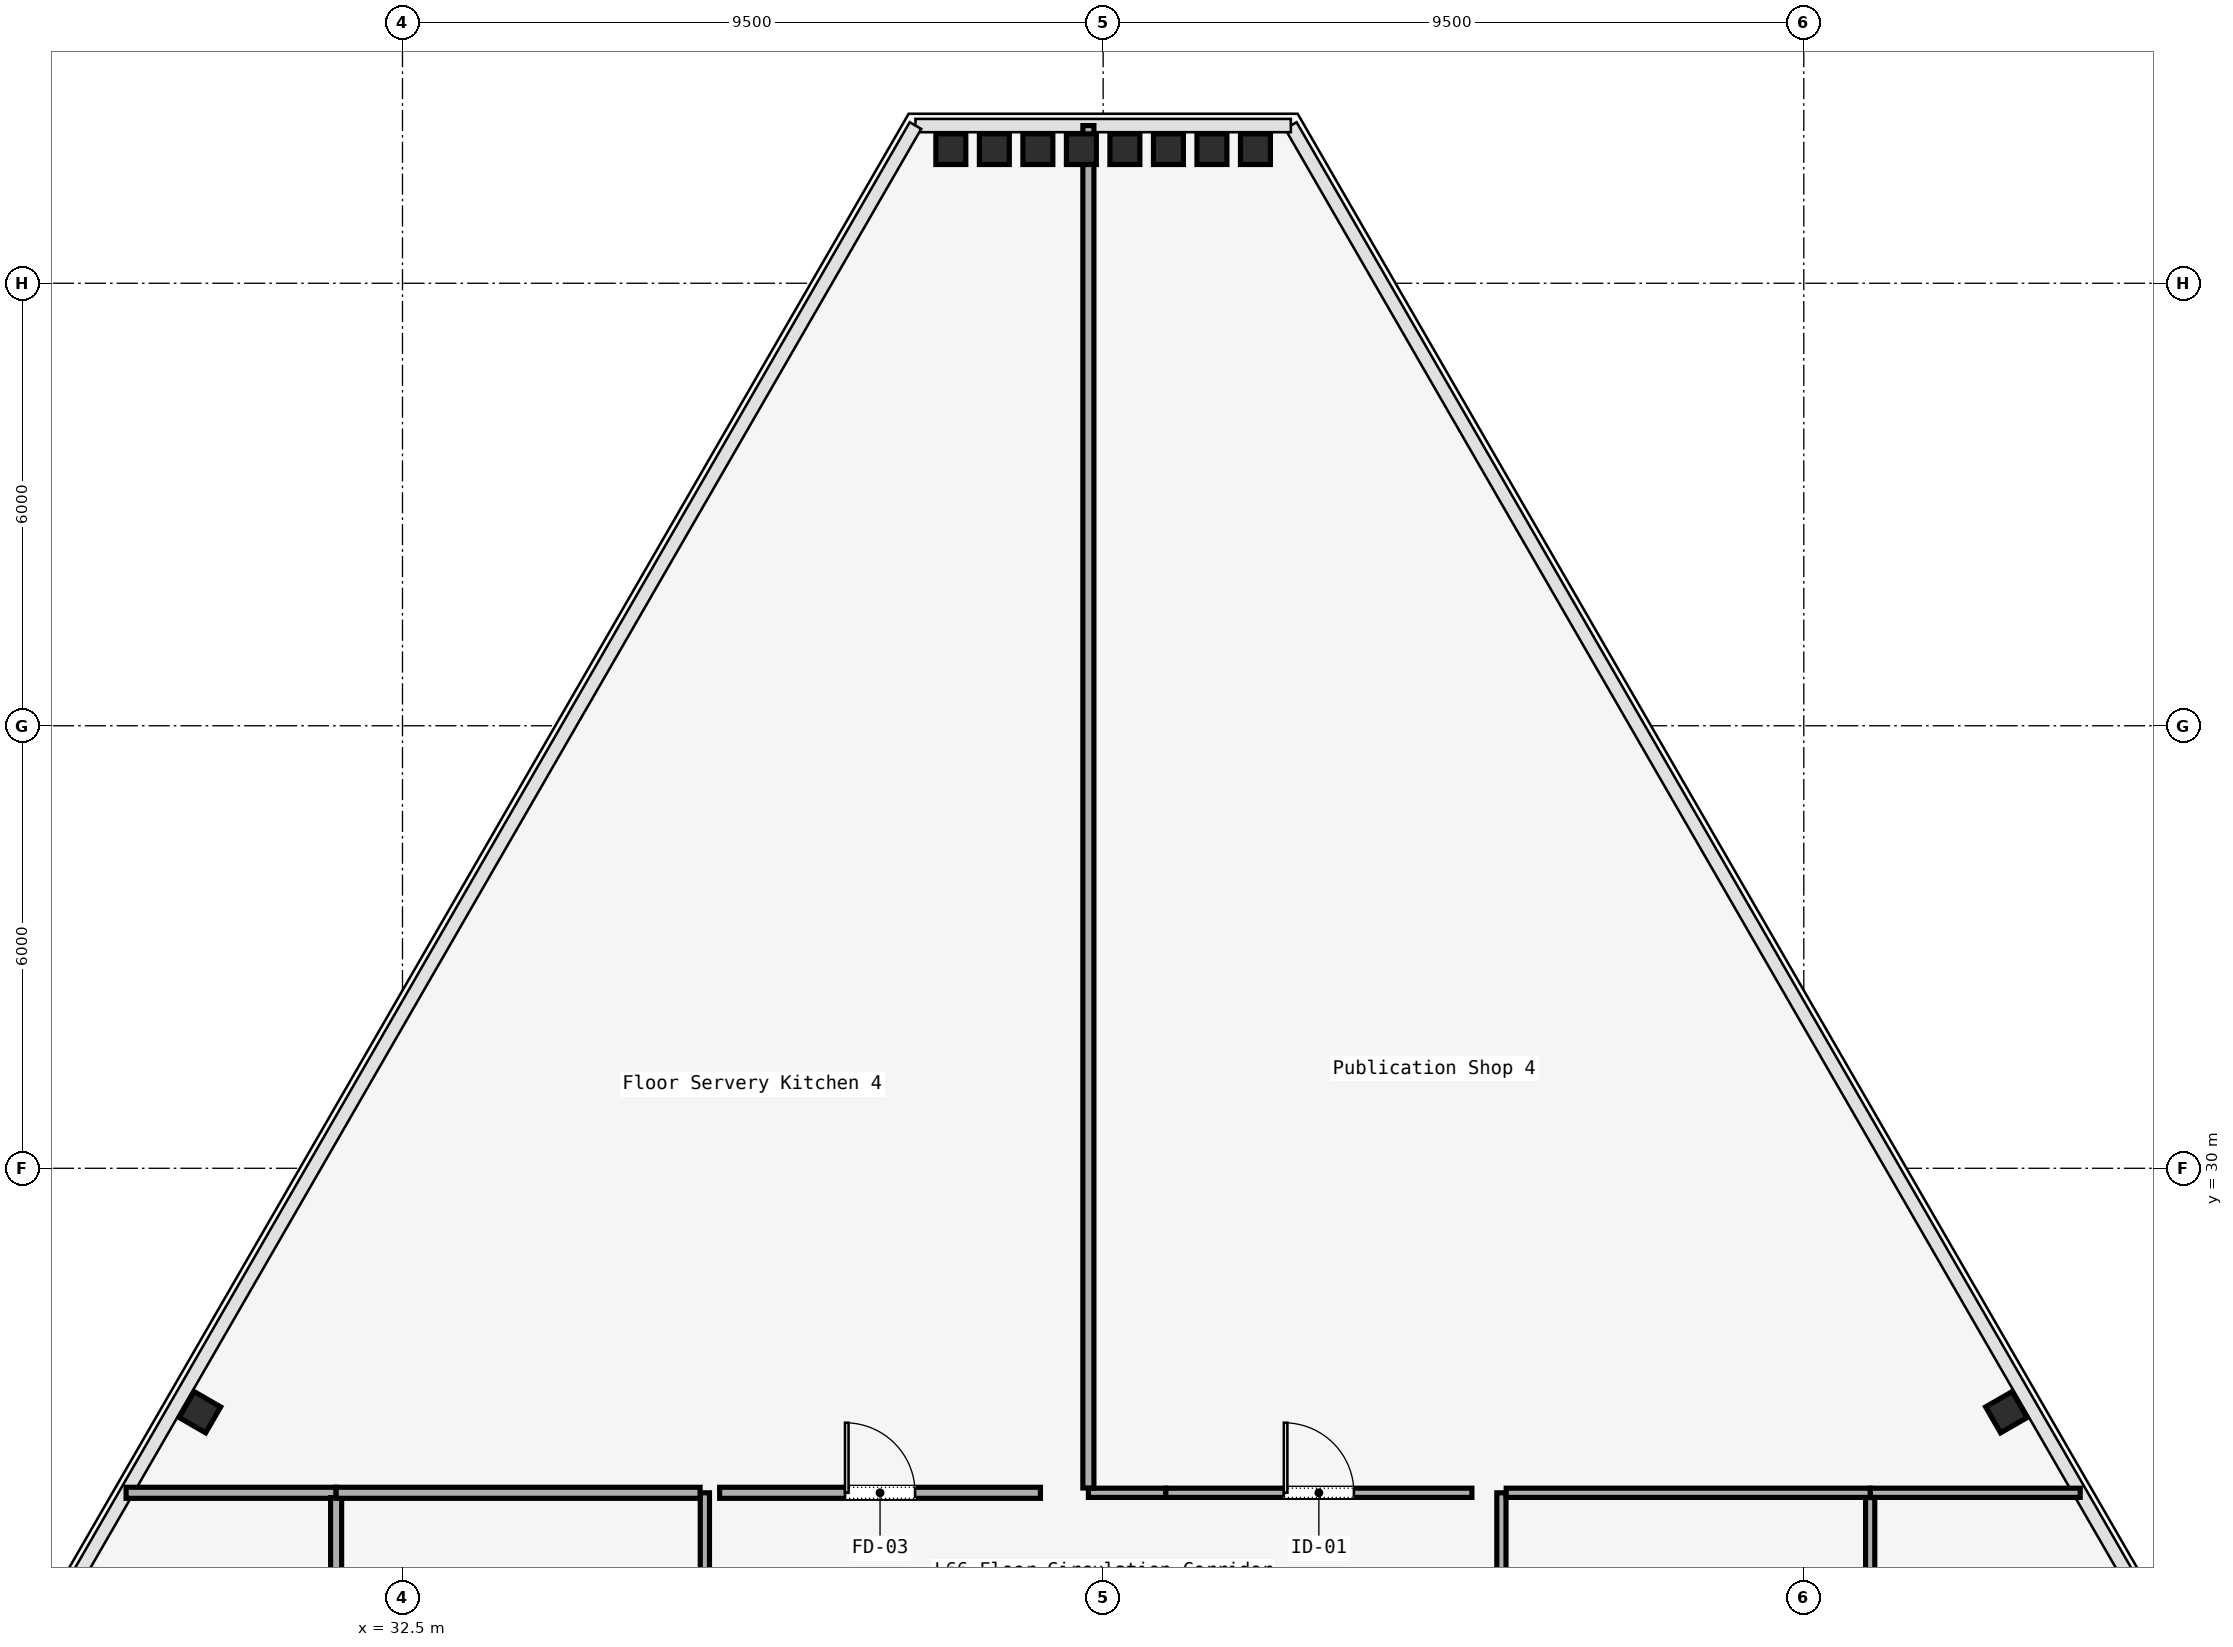
"""IFC4 building model, lengths in metres.
Left out: names, types, materials, properties, quantities, classifications, styles, units other than length and angle.
Written with IfcOpenShell. Run it as: python <this file> out.ifc"""

import sys

from ifc_helpers import new_model, si_unit, direction, frame, frame_2d, origin, origin_2d, place, context, subcontext, project, spatial, rectangle, i_section, extrude, element, fill, save


model = new_model("IFC4")
c1 = context("Model", 3, precision=1e-05, world=origin(), true_north=direction((0.0, 1.0)))
c2 = subcontext(c1, "Body", "Model", "MODEL_VIEW")
j1 = project(units=[si_unit("LENGTHUNIT", "METRE"), si_unit("PLANEANGLEUNIT", "RADIAN")], contexts=[c1])
p1 = place(None, origin())
s1 = spatial("IfcSite", under=j1, at=p1, CompositionType="ELEMENT")
p2 = place(p1, origin())
s2 = spatial("IfcBuilding", under=s1, at=p2, CompositionType="ELEMENT")
p3 = place(p2, frame((0.0, 0.0, 271.2)))
s3 = spatial("IfcBuildingStorey", under=s2, at=p3, CompositionType="ELEMENT", Elevation=271.2)
for number, where, z_axis, x_axis in (
    (1, (54.247, 26.693, 0.0), (0.0, 0.0, 1.0), (-0.5, 0.866, 0.0)),
    (2, (44.065, 43.818, 0.0), (0.0, 0.0, 1.0), (1.0, 0.0, 0.0)),
    (3, (43.475, 43.818, 0.0), (0.0, 0.0, 1.0), (1.0, 0.0, 0.0)),
    (4, (42.885, 43.818, 0.0), (0.0, 0.0, 1.0), (1.0, 0.0, 0.0)),
    (5, (42.295, 43.818, 0.0), (0.0, 0.0, 1.0), (1.0, 0.0, 0.0)),
    (6, (41.705, 43.818, 0.0), (0.0, 0.0, 1.0), (1.0, 0.0, 0.0)),
    (7, (41.115, 43.818, 0.0), (0.0, 0.0, 1.0), (1.0, 0.0, 0.0)),
    (8, (40.525, 43.818, 0.0), (0.0, 0.0, 1.0), (1.0, 0.0, 0.0)),
    (9, (39.935, 43.818, 0.0), (0.0, 0.0, 1.0), (1.0, 0.0, 0.0)),
    (10, (29.753, 26.693, 0.0), (0.0, 0.0, 1.0), (0.5, 0.866, 0.0)),
):
    element("IfcColumn", number, at=place(p3, frame(where, z_axis=z_axis, x_axis=x_axis)), inside=s3, PredefinedType="COLUMN", context=c2, shape_type="SweptSolid", body=[
        extrude(i_section(OverallWidth=0.406, OverallDepth=0.416, WebThickness=0.03, FlangeThickness=0.037, FilletRadius=0.015, at=origin_2d()), origin(), (0.0, 0.0, 1.0), 3.58),
    ])
p4 = place(p3, frame((36.6, 23.965, 0.0), z_axis=(0.0, 0.0, 1.0), x_axis=(0.0, 1.0, 0.0)))
e11 = element("IfcWall", 11, at=p4, inside=s3, PredefinedType="PARTITIONING", context=c2, shape_type="SweptSolid", body=[
    extrude(rectangle(XDim=1.635, YDim=0.125, at=frame_2d((0.817, 0.0))), origin(), (0.0, 0.0, 1.0), 3.01),
])
p5 = place(p3, frame((36.8, 25.6, 0.0), z_axis=(0.0, 0.0, 1.0), x_axis=(1.0, 0.0, 0.0)))
e12 = element("IfcWall", 12, at=p5, inside=s3, PredefinedType="PARTITIONING", context=c2, shape_type="SweptSolid", body=[
    extrude(rectangle(XDim=4.35, YDim=0.15, at=frame_2d((2.175, 0.0))), origin(), (0.0, 0.0, 1.0), 3.01),
])
p6 = place(p5, frame((1.7, 0.0, 0.0)))
e13 = element("IfcOpeningElement", 13, at=p6, cuts=e12, PredefinedType="OPENING", context=c2, shape_type="SweptSolid", body=[
    extrude(rectangle(XDim=0.95, YDim=2.2, at=frame_2d((0.475, 1.1))), frame((0.0, 0.075, 0.0), z_axis=(0.0, -1.0, 0.0), x_axis=(1.0, 0.0, 0.0)), (0.0, 0.0, 1.0), 0.15),
])
p7 = place(p3, frame((41.8, 25.6, 0.0), z_axis=(0.0, 0.0, 1.0), x_axis=(1.0, 0.0, 0.0)))
e14 = element("IfcWall", 14, at=p7, inside=s3, PredefinedType="PARTITIONING", context=c2, shape_type="SweptSolid", body=[
    extrude(rectangle(XDim=1.05, YDim=0.125, at=frame_2d((0.525, 0.0))), origin(), (0.0, 0.0, 1.0), 3.01),
])
p8 = place(p3, frame((42.85, 25.6, 0.0), z_axis=(0.0, 0.0, 1.0), x_axis=(1.0, 0.0, 0.0)))
e15 = element("IfcWall", 15, at=p8, inside=s3, PredefinedType="PARTITIONING", context=c2, shape_type="SweptSolid", body=[
    extrude(rectangle(XDim=4.15, YDim=0.125, at=frame_2d((2.075, 0.0))), origin(), (0.0, 0.0, 1.0), 3.01),
])
p9 = place(p8, frame((1.6, 0.0, 0.0)))
e16 = element("IfcOpeningElement", 16, at=p9, cuts=e15, PredefinedType="OPENING", context=c2, shape_type="SweptSolid", body=[
    extrude(rectangle(XDim=0.95, YDim=2.2, at=frame_2d((0.475, 1.1))), frame((0.0, 0.062, 0.0), z_axis=(0.0, -1.0, 0.0), x_axis=(1.0, 0.0, 0.0)), (0.0, 0.0, 1.0), 0.125),
])
p10 = place(p3, frame((47.4, 25.6, 0.0), z_axis=(0.0, 0.0, 1.0), x_axis=(0.0, -1.0, 0.0)))
e17 = element("IfcWall", 17, at=p10, inside=s3, PredefinedType="PARTITIONING", context=c2, shape_type="SweptSolid", body=[
    extrude(rectangle(XDim=1.7, YDim=0.125, at=frame_2d((0.85, 0.0))), origin(), (0.0, 0.0, 1.0), 3.01),
])
p11 = place(p3, frame((28.752, 25.6, 0.0), z_axis=(0.0, 0.0, 1.0), x_axis=(1.0, 0.0, 0.0)))
e18 = element("IfcWall", 18, at=p11, inside=s3, PredefinedType="PARTITIONING", context=c2, shape_type="SweptSolid", body=[
    extrude(rectangle(XDim=2.848, YDim=0.15, at=frame_2d((1.424, 0.0))), origin(), (0.0, 0.0, 1.0), 3.01),
])
p12 = place(p3, frame((31.6, 25.535, 0.0), z_axis=(0.0, 0.0, 1.0), x_axis=(0.0, -1.0, 0.0)))
e19 = element("IfcWall", 19, at=p12, inside=s3, PredefinedType="PARTITIONING", context=c2, shape_type="SweptSolid", body=[
    extrude(rectangle(XDim=8.47, YDim=0.15, at=frame_2d((4.235, 0.0))), origin(), (0.0, 0.0, 1.0), 3.01),
])
p13 = place(p3, frame((52.4, 25.6, 0.0), z_axis=(0.0, 0.0, 1.0), x_axis=(1.0, 0.0, 0.0)))
e20 = element("IfcWall", 20, at=p13, inside=s3, PredefinedType="PARTITIONING", context=c2, shape_type="SweptSolid", body=[
    extrude(rectangle(XDim=2.848, YDim=0.125, at=frame_2d((1.424, 0.0))), origin(), (0.0, 0.0, 1.0), 3.01),
])
p14 = place(p3, frame((52.4, 17.065, 0.0), z_axis=(0.0, 0.0, 1.0), x_axis=(0.0, 1.0, 0.0)))
e21 = element("IfcWall", 21, at=p14, inside=s3, PredefinedType="PARTITIONING", context=c2, shape_type="SweptSolid", body=[
    extrude(rectangle(XDim=8.47, YDim=0.125, at=frame_2d((4.235, 0.0))), origin(), (0.0, 0.0, 1.0), 3.01),
])
p15 = place(p3, frame((31.6, 25.6, 0.0), z_axis=(0.0, 0.0, 1.0), x_axis=(1.0, 0.0, 0.0)))
e22 = element("IfcWall", 22, at=p15, inside=s3, PredefinedType="PARTITIONING", context=c2, shape_type="SweptSolid", body=[
    extrude(rectangle(XDim=4.935, YDim=0.15, at=frame_2d((2.467, 0.0))), origin(), (0.0, 0.0, 1.0), 3.01),
])
p16 = place(p3, frame((47.465, 25.6, 0.0), z_axis=(0.0, 0.0, 1.0), x_axis=(1.0, 0.0, 0.0)))
e23 = element("IfcWall", 23, at=p16, inside=s3, PredefinedType="PARTITIONING", context=c2, shape_type="SweptSolid", body=[
    extrude(rectangle(XDim=4.935, YDim=0.125, at=frame_2d((2.467, 0.0))), origin(), (0.0, 0.0, 1.0), 3.01),
])
p17 = place(p3, frame((41.8, 44.138, 0.0), z_axis=(0.0, 0.0, 1.0), x_axis=(0.0, -1.0, 0.0)))
e24 = element("IfcWall", 24, at=p17, inside=s3, PredefinedType="PARTITIONING", context=c2, shape_type="SweptSolid", body=[
    extrude(rectangle(XDim=18.473, YDim=0.15, at=frame_2d((9.236, 0.0))), origin(), (0.0, 0.0, 1.0), 3.01),
])
p18 = place(p6, origin())
e25 = element("IfcDoor", 25, at=p18, inside=s3, OperationType="SINGLE_SWING_LEFT", PredefinedType="DOOR", context=c2, shape_type="SweptSolid", body=[
    extrude(rectangle(XDim=0.95, YDim=2.2, at=frame_2d((0.475, 1.1))), frame((0.0, 0.025, 0.0), z_axis=(0.0, -1.0, 0.0), x_axis=(1.0, 0.0, 0.0)), (0.0, 0.0, 1.0), 0.05),
])
fill(e13, e25)
p19 = place(p9, origin())
e26 = element("IfcDoor", 26, at=p19, inside=s3, OperationType="SINGLE_SWING_RIGHT", PredefinedType="DOOR", context=c2, shape_type="SweptSolid", body=[
    extrude(rectangle(XDim=0.95, YDim=2.2, at=frame_2d((0.475, 1.1))), frame((0.0, 0.025, 0.0), z_axis=(0.0, -1.0, 0.0), x_axis=(1.0, 0.0, 0.0)), (0.0, 0.0, 1.0), 0.05),
])
fill(e16, e26)
save(model, sys.argv[1])
